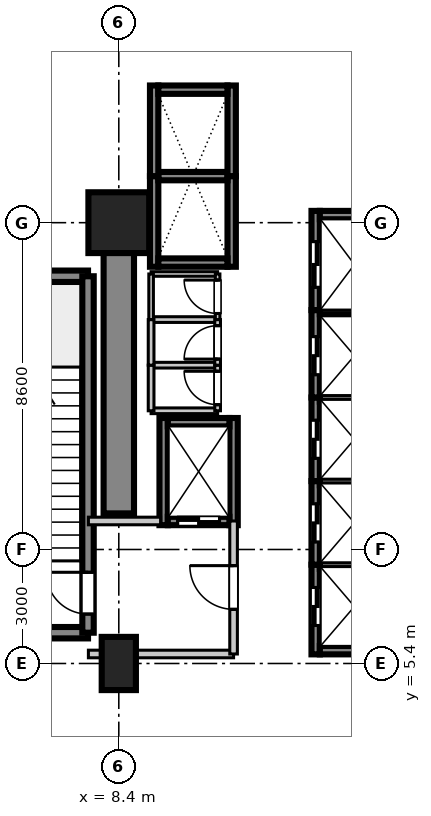
"""IFC4 building model, lengths in metres.
Left out: names, types, materials, properties, quantities, classifications, styles, units other than length and angle.
Written with IfcOpenShell. Run it as: python <this file> out.ifc"""

import sys

from ifc_helpers import new_model, si_unit, direction, frame, frame_2d, origin, origin_2d, place, context, subcontext, project, spatial, rectangle, extrude, source, transform, mapped, element, fill, save


model = new_model("IFC4")
c1 = context("Model", 3, precision=1e-05, world=origin(), true_north=direction((0.0, 1.0)))
c2 = subcontext(c1, "Body", "Model", "MODEL_VIEW")
j1 = project(units=[si_unit("LENGTHUNIT", "METRE"), si_unit("PLANEANGLEUNIT", "RADIAN")], contexts=[c1])
p1 = place(None, origin())
s1 = spatial("IfcSite", under=j1, at=p1, CompositionType="ELEMENT")
p2 = place(p1, origin())
s2 = spatial("IfcBuilding", under=s1, at=p2, CompositionType="ELEMENT")
p3 = place(p2, frame((0.0, 0.0, 16.2)))
s3 = spatial("IfcBuildingStorey", under=s2, at=p3, CompositionType="ELEMENT", Elevation=16.2)
m1 = source(origin(), c2, "Body", "SweptSolid", [
    extrude(rectangle(XDim=0.9, YDim=1.4, at=origin_2d()), origin(), (0.0, 0.0, 1.0), 5.355),
])
p4 = place(p3, frame((8.4, 5.4, 0.0), z_axis=(0.0, 0.0, 1.0), x_axis=(1.0, 0.0, 0.0)))
e1 = element("IfcColumn", 1, at=p4, inside=s3, PredefinedType="PILASTER", context=c2, shape_type="MappedRepresentation", body=[
    mapped(m1, transform((0.0, 0.0, 0.0), scale=1.0)),
])
m2 = source(origin(), c2, "Body", "SweptSolid", [
    extrude(rectangle(XDim=1.6, YDim=1.6, at=origin_2d()), origin(), (0.0, 0.0, 1.0), 5.355),
])
p5 = place(p3, frame((8.4, 17.0, 0.0), z_axis=(0.0, 0.0, 1.0), x_axis=(1.0, 0.0, 0.0)))
e2 = element("IfcColumn", 2, at=p5, inside=s3, PredefinedType="COLUMN", context=c2, shape_type="MappedRepresentation", body=[
    mapped(m2, transform((0.0, 0.0, 0.0), scale=1.0)),
])
m3 = source(origin(), c2, "Body", "SweptSolid", [
    extrude(rectangle(XDim=7.65, YDim=0.8, at=frame_2d((3.825, 0.0))), origin(), (0.0, 0.0, 1.0), 5.08),
])
p6 = place(p3, frame((8.4, 9.35, 0.0), z_axis=(0.0, 0.0, 1.0), x_axis=(0.0, 1.0, 0.0)))
e3 = element("IfcWall", 3, at=p6, inside=s3, PredefinedType="SHEAR", context=c2, shape_type="MappedRepresentation", body=[
    mapped(m3, transform((0.0, 0.0, 0.0), scale=1.0)),
])
m4 = source(origin(), c2, "Body", "SweptSolid", [
    extrude(rectangle(XDim=3.98, YDim=0.3, at=frame_2d((1.99, 0.0))), origin(), (0.0, 0.0, 1.0), 5.08),
])
for number, where, z_axis, x_axis in (
    (4, (3.61, 6.21, 0.0), (0.0, 0.0, 1.0), (1.0, 0.0, 0.0)),
    (5, (3.61, 15.59, 0.0), (0.0, 0.0, 1.0), (1.0, 0.0, 0.0)),
):
    element("IfcWall", number, at=place(p3, frame(where, z_axis=z_axis, x_axis=x_axis)), inside=s3, PredefinedType="SHEAR", context=c2, shape_type="MappedRepresentation", body=[
        mapped(m4, transform((0.0, 0.0, 0.0), scale=1.0)),
    ])
m5 = source(origin(), c2, "Body", "SweptSolid", [
    extrude(rectangle(XDim=9.38, YDim=0.3, at=frame_2d((4.69, 0.0))), origin(), (0.0, 0.0, 1.0), 5.08),
])
p7 = place(p3, frame((7.59, 6.21, 0.0), z_axis=(0.0, 0.0, 1.0), x_axis=(0.0, 1.0, 0.0)))
e6 = element("IfcWall", 6, at=p7, inside=s3, PredefinedType="SHEAR", context=c2, shape_type="MappedRepresentation", body=[
    mapped(m5, transform((0.0, 0.0, 0.0), scale=1.0)),
])
p8 = place(p7, frame((0.49, 0.0, 0.0)))
e7 = element("IfcOpeningElement", 7, at=p8, cuts=e6, PredefinedType="OPENING", context=c2, shape_type="SweptSolid", body=[
    extrude(rectangle(XDim=1.1, YDim=2.15, at=frame_2d((0.55, 1.075))), frame((0.0, 0.16, 0.0), z_axis=(0.0, -1.0, 0.0), x_axis=(1.0, 0.0, 0.0)), (0.0, 0.0, 1.0), 0.32),
])
m6 = source(origin(), c2, "Body", "SweptSolid", [
    extrude(rectangle(XDim=2.36, YDim=0.22, at=frame_2d((1.18, 0.0))), origin(), (0.0, 0.0, 1.0), 5.08),
])
p9 = place(p3, frame((13.58, 5.64, 0.0), z_axis=(0.0, 0.0, 1.0), x_axis=(0.0, 1.0, 0.0)))
e8 = element("IfcWall", 8, at=p9, inside=s3, PredefinedType="SHEAR", context=c2, shape_type="MappedRepresentation", body=[
    mapped(m6, transform((0.0, 0.0, 0.0), scale=1.0)),
])
p10 = place(p9, frame((0.76, 0.0, 0.0)))
e9 = element("IfcOpeningElement", 9, at=p10, cuts=e8, PredefinedType="OPENING", context=c2, shape_type="SweptSolid", body=[
    extrude(rectangle(XDim=1.0, YDim=2.2, at=frame_2d((0.5, 1.1))), frame((0.0, 0.12, 0.0), z_axis=(0.0, -1.0, 0.0), x_axis=(1.0, 0.0, 0.0)), (0.0, 0.0, 1.0), 0.24),
])
m7 = source(origin(), c2, "Body", "SweptSolid", [
    extrude(rectangle(XDim=1.82, YDim=0.22, at=frame_2d((0.91, 0.0))), origin(), (0.0, 0.0, 1.0), 5.08),
])
p11 = place(p3, frame((13.69, 5.75, 0.0), z_axis=(0.0, 0.0, 1.0), x_axis=(1.0, 0.0, 0.0)))
e10 = element("IfcWall", 10, at=p11, inside=s3, PredefinedType="SHEAR", context=c2, shape_type="MappedRepresentation", body=[
    mapped(m7, transform((0.0, 0.0, 0.0), scale=1.0)),
])
m8 = source(origin(), c2, "Body", "SweptSolid", [
    extrude(rectangle(XDim=1.82, YDim=0.22, at=frame_2d((0.91, 0.0))), origin(), (0.0, 0.0, 1.0), 5.4),
])
p12 = place(p3, frame((13.69, 8.0, 0.0), z_axis=(0.0, 0.0, 1.0), x_axis=(1.0, 0.0, 0.0)))
e11 = element("IfcWall", 11, at=p12, inside=s3, PredefinedType="SHEAR", context=c2, shape_type="MappedRepresentation", body=[
    mapped(m8, transform((0.0, 0.0, 0.0), scale=1.0)),
])
m9 = source(origin(), c2, "Body", "SweptSolid", [
    extrude(rectangle(XDim=2.2, YDim=0.22, at=frame_2d((1.1, 0.0))), origin(), (0.0, 0.0, 1.0), 5.08),
])
p13 = place(p3, frame((13.58, 8.0, 0.0), z_axis=(0.0, 0.0, 1.0), x_axis=(0.0, 1.0, 0.0)))
e12 = element("IfcWall", 12, at=p13, inside=s3, PredefinedType="SHEAR", context=c2, shape_type="MappedRepresentation", body=[
    mapped(m9, transform((0.0, 0.0, 0.0), scale=1.0)),
])
p14 = place(p13, frame((0.6, 0.0, 0.0)))
e13 = element("IfcOpeningElement", 13, at=p14, cuts=e12, PredefinedType="OPENING", context=c2, shape_type="SweptSolid", body=[
    extrude(rectangle(XDim=1.0, YDim=2.2, at=frame_2d((0.5, 1.1))), frame((0.0, 0.12, 0.0), z_axis=(0.0, -1.0, 0.0), x_axis=(1.0, 0.0, 0.0)), (0.0, 0.0, 1.0), 0.24),
])
p15 = place(p3, frame((13.69, 10.2, 0.0), z_axis=(0.0, 0.0, 1.0), x_axis=(1.0, 0.0, 0.0)))
e14 = element("IfcWall", 14, at=p15, inside=s3, PredefinedType="SHEAR", context=c2, shape_type="MappedRepresentation", body=[
    mapped(m8, transform((0.0, 0.0, 0.0), scale=1.0)),
])
p16 = place(p3, frame((13.58, 10.2, 0.0), z_axis=(0.0, 0.0, 1.0), x_axis=(0.0, 1.0, 0.0)))
e15 = element("IfcWall", 15, at=p16, inside=s3, PredefinedType="SHEAR", context=c2, shape_type="MappedRepresentation", body=[
    mapped(m9, transform((0.0, 0.0, 0.0), scale=1.0)),
])
p17 = place(p16, frame((0.6, 0.0, 0.0)))
e16 = element("IfcOpeningElement", 16, at=p17, cuts=e15, PredefinedType="OPENING", context=c2, shape_type="SweptSolid", body=[
    extrude(rectangle(XDim=1.0, YDim=2.2, at=frame_2d((0.5, 1.1))), frame((0.0, 0.12, 0.0), z_axis=(0.0, -1.0, 0.0), x_axis=(1.0, 0.0, 0.0)), (0.0, 0.0, 1.0), 0.24),
])
p18 = place(p3, frame((13.69, 12.4, 0.0), z_axis=(0.0, 0.0, 1.0), x_axis=(1.0, 0.0, 0.0)))
e17 = element("IfcWall", 17, at=p18, inside=s3, PredefinedType="SHEAR", context=c2, shape_type="MappedRepresentation", body=[
    mapped(m8, transform((0.0, 0.0, 0.0), scale=1.0)),
])
m10 = source(origin(), c2, "Body", "SweptSolid", [
    extrude(rectangle(XDim=2.3, YDim=0.22, at=frame_2d((1.15, 0.0))), origin(), (0.0, 0.0, 1.0), 5.08),
])
p19 = place(p3, frame((13.58, 12.4, 0.0), z_axis=(0.0, 0.0, 1.0), x_axis=(0.0, 1.0, 0.0)))
e18 = element("IfcWall", 18, at=p19, inside=s3, PredefinedType="SHEAR", context=c2, shape_type="MappedRepresentation", body=[
    mapped(m10, transform((0.0, 0.0, 0.0), scale=1.0)),
])
p20 = place(p19, frame((0.6, 0.0, 0.0)))
e19 = element("IfcOpeningElement", 19, at=p20, cuts=e18, PredefinedType="OPENING", context=c2, shape_type="SweptSolid", body=[
    extrude(rectangle(XDim=1.0, YDim=2.2, at=frame_2d((0.5, 1.1))), frame((0.0, 0.12, 0.0), z_axis=(0.0, -1.0, 0.0), x_axis=(1.0, 0.0, 0.0)), (0.0, 0.0, 1.0), 0.24),
])
p21 = place(p3, frame((13.69, 14.7, 0.0), z_axis=(0.0, 0.0, 1.0), x_axis=(1.0, 0.0, 0.0)))
e20 = element("IfcWall", 20, at=p21, inside=s3, PredefinedType="SHEAR", context=c2, shape_type="MappedRepresentation", body=[
    mapped(m8, transform((0.0, 0.0, 0.0), scale=1.0)),
])
m11 = source(origin(), c2, "Body", "SweptSolid", [
    extrude(rectangle(XDim=2.385, YDim=0.22, at=frame_2d((1.192, 0.0))), origin(), (0.0, 0.0, 1.0), 5.08),
])
for number, where, z_axis, x_axis in (
    (21, (9.33, 15.84, 0.0), (0.0, 0.0, 1.0), (0.0, 1.0, 0.0)),
    (22, (11.37, 15.84, 0.0), (0.0, 0.0, 1.0), (0.0, 1.0, 0.0)),
):
    element("IfcWall", number, at=place(p3, frame(where, z_axis=z_axis, x_axis=x_axis)), inside=s3, PredefinedType="SHEAR", context=c2, shape_type="MappedRepresentation", body=[
        mapped(m11, transform((0.0, 0.0, 0.0), scale=1.0)),
    ])
p22 = place(p3, frame((9.44, 15.95, 0.0), z_axis=(0.0, 0.0, 1.0), x_axis=(1.0, 0.0, 0.0)))
e23 = element("IfcWall", 23, at=p22, inside=s3, PredefinedType="SHEAR", context=c2, shape_type="MappedRepresentation", body=[
    mapped(m7, transform((0.0, 0.0, 0.0), scale=1.0)),
])
p23 = place(p3, frame((9.44, 18.225, 0.0), z_axis=(0.0, 0.0, 1.0), x_axis=(1.0, 0.0, 0.0)))
e24 = element("IfcWall", 24, at=p23, inside=s3, PredefinedType="SHEAR", context=c2, shape_type="MappedRepresentation", body=[
    mapped(m8, transform((0.0, 0.0, 0.0), scale=1.0)),
])
for number, where, z_axis, x_axis in (
    (25, (9.33, 18.225, 0.0), (0.0, 0.0, 1.0), (0.0, 1.0, 0.0)),
    (26, (11.37, 18.225, 0.0), (0.0, 0.0, 1.0), (0.0, 1.0, 0.0)),
):
    element("IfcWall", number, at=place(p3, frame(where, z_axis=z_axis, x_axis=x_axis)), inside=s3, PredefinedType="SHEAR", context=c2, shape_type="MappedRepresentation", body=[
        mapped(m11, transform((0.0, 0.0, 0.0), scale=1.0)),
    ])
p24 = place(p3, frame((9.44, 20.5, 0.0), z_axis=(0.0, 0.0, 1.0), x_axis=(1.0, 0.0, 0.0)))
e27 = element("IfcWall", 27, at=p24, inside=s3, PredefinedType="SHEAR", context=c2, shape_type="MappedRepresentation", body=[
    mapped(m7, transform((0.0, 0.0, 0.0), scale=1.0)),
])
m12 = source(origin(), c2, "Body", "SweptSolid", [
    extrude(rectangle(XDim=2.82, YDim=0.22, at=frame_2d((1.41, 0.0))), origin(), (0.0, 0.0, 1.0), 5.08),
])
for number, where, z_axis, x_axis in (
    (28, (9.58, 9.04, 0.0), (0.0, 0.0, 1.0), (0.0, 1.0, 0.0)),
    (29, (11.42, 9.04, 0.0), (0.0, 0.0, 1.0), (0.0, 1.0, 0.0)),
):
    element("IfcWall", number, at=place(p3, frame(where, z_axis=z_axis, x_axis=x_axis)), inside=s3, PredefinedType="SHEAR", context=c2, shape_type="MappedRepresentation", body=[
        mapped(m12, transform((0.0, 0.0, 0.0), scale=1.0)),
    ])
m13 = source(origin(), c2, "Body", "SweptSolid", [
    extrude(rectangle(XDim=1.62, YDim=0.22, at=frame_2d((0.81, 0.0))), origin(), (0.0, 0.0, 1.0), 5.08),
])
p25 = place(p3, frame((9.69, 9.15, 0.0), z_axis=(0.0, 0.0, 1.0), x_axis=(1.0, 0.0, 0.0)))
e30 = element("IfcWall", 30, at=p25, inside=s3, PredefinedType="SHEAR", context=c2, shape_type="MappedRepresentation", body=[
    mapped(m13, transform((0.0, 0.0, 0.0), scale=1.0)),
])
p26 = place(p25, frame((0.26, 0.0, 0.0)))
e31 = element("IfcOpeningElement", 31, at=p26, cuts=e30, PredefinedType="OPENING", context=c2, shape_type="SweptSolid", body=[
    extrude(rectangle(XDim=1.1, YDim=2.2, at=frame_2d((0.55, 1.1))), frame((0.0, 0.12, 0.0), z_axis=(0.0, -1.0, 0.0), x_axis=(1.0, 0.0, 0.0)), (0.0, 0.0, 1.0), 0.24),
])
p27 = place(p3, frame((9.69, 11.75, 0.0), z_axis=(0.0, 0.0, 1.0), x_axis=(1.0, 0.0, 0.0)))
e32 = element("IfcWall", 32, at=p27, inside=s3, PredefinedType="SHEAR", context=c2, shape_type="MappedRepresentation", body=[
    mapped(m13, transform((0.0, 0.0, 0.0), scale=1.0)),
])
m14 = source(origin(), c2, "Body", "SweptSolid", [
    extrude(rectangle(XDim=2.61, YDim=0.22, at=frame_2d((1.305, 0.0))), origin(), (0.0, 0.0, 1.0), 5.08),
])
p28 = place(p3, frame((13.58, 14.7, 0.0), z_axis=(0.0, 0.0, 1.0), x_axis=(0.0, 1.0, 0.0)))
e33 = element("IfcWall", 33, at=p28, inside=s3, PredefinedType="SHEAR", context=c2, shape_type="MappedRepresentation", body=[
    mapped(m14, transform((0.0, 0.0, 0.0), scale=1.0)),
])
p29 = place(p28, frame((0.6, 0.0, 0.0)))
e34 = element("IfcOpeningElement", 34, at=p29, cuts=e33, PredefinedType="OPENING", context=c2, shape_type="SweptSolid", body=[
    extrude(rectangle(XDim=1.2, YDim=2.2, at=frame_2d((0.6, 1.1))), frame((0.0, 0.12, 0.0), z_axis=(0.0, -1.0, 0.0), x_axis=(1.0, 0.0, 0.0)), (0.0, 0.0, 1.0), 0.24),
])
p30 = place(p3, frame((13.69, 17.2, 0.0), z_axis=(0.0, 0.0, 1.0), x_axis=(1.0, 0.0, 0.0)))
e35 = element("IfcWall", 35, at=p30, inside=s3, PredefinedType="SHEAR", context=c2, shape_type="MappedRepresentation", body=[
    mapped(m7, transform((0.0, 0.0, 0.0), scale=1.0)),
])
m15 = source(origin(), c2, "Body", "SweptSolid", [
    extrude(rectangle(XDim=3.82, YDim=0.2, at=frame_2d((1.91, 0.0))), origin(), (0.0, 0.0, 1.0), 3.4),
])
p31 = place(p3, frame((7.6, 5.65, 0.0), z_axis=(0.0, 0.0, 1.0), x_axis=(1.0, 0.0, 0.0)))
e36 = element("IfcWall", 36, at=p31, inside=s3, PredefinedType="PARTITIONING", context=c2, shape_type="MappedRepresentation", body=[
    mapped(m15, transform((0.0, 0.0, 0.0), scale=1.0)),
])
m16 = source(origin(), c2, "Body", "SweptSolid", [
    extrude(rectangle(XDim=1.9, YDim=0.2, at=frame_2d((0.95, 0.0))), origin(), (0.0, 0.0, 1.0), 3.4),
])
p32 = place(p3, frame((7.6, 9.15, 0.0), z_axis=(0.0, 0.0, 1.0), x_axis=(1.0, 0.0, 0.0)))
e37 = element("IfcWall", 37, at=p32, inside=s3, PredefinedType="PARTITIONING", context=c2, shape_type="MappedRepresentation", body=[
    mapped(m16, transform((0.0, 0.0, 0.0), scale=1.0)),
])
m17 = source(origin(), c2, "Body", "SweptSolid", [
    extrude(rectangle(XDim=3.5, YDim=0.2, at=frame_2d((1.75, 0.0))), origin(), (0.0, 0.0, 1.0), 3.4),
])
p33 = place(p3, frame((11.42, 5.65, 0.0), z_axis=(0.0, 0.0, 1.0), x_axis=(0.0, 1.0, 0.0)))
e38 = element("IfcWall", 38, at=p33, inside=s3, PredefinedType="PARTITIONING", context=c2, shape_type="MappedRepresentation", body=[
    mapped(m17, transform((0.0, 0.0, 0.0), scale=1.0)),
])
p34 = place(p33, frame((1.175, 0.0, 0.0)))
e39 = element("IfcOpeningElement", 39, at=p34, cuts=e38, PredefinedType="OPENING", context=c2, shape_type="SweptSolid", body=[
    extrude(rectangle(XDim=1.15, YDim=2.15, at=frame_2d((0.575, 1.075))), frame((0.0, 0.11, 0.0), z_axis=(0.0, -1.0, 0.0), x_axis=(1.0, 0.0, 0.0)), (0.0, 0.0, 1.0), 0.22),
])
m18 = source(origin(), c2, "Body", "SweptSolid", [
    extrude(rectangle(XDim=1.75, YDim=0.15, at=frame_2d((0.875, 0.0))), origin(), (0.0, 0.0, 1.0), 3.4),
])
for number, where, z_axis, x_axis in (
    (40, (9.25, 12.05, 0.0), (0.0, 0.0, 1.0), (1.0, 0.0, 0.0)),
    (41, (9.25, 13.25, 0.0), (0.0, 0.0, 1.0), (1.0, 0.0, 0.0)),
):
    element("IfcWall", number, at=place(p3, frame(where, z_axis=z_axis, x_axis=x_axis)), inside=s3, PredefinedType="PARTITIONING", context=c2, shape_type="MappedRepresentation", body=[
        mapped(m18, transform((0.0, 0.0, 0.0), scale=1.0)),
    ])
m19 = source(origin(), c2, "Body", "SweptSolid", [
    extrude(rectangle(XDim=1.2, YDim=0.15, at=frame_2d((0.6, 0.0))), origin(), (0.0, 0.0, 1.0), 3.4),
])
p35 = place(p3, frame((9.25, 12.05, 0.0), z_axis=(0.0, 0.0, 1.0), x_axis=(0.0, 1.0, 0.0)))
e42 = element("IfcWall", 42, at=p35, inside=s3, PredefinedType="PARTITIONING", context=c2, shape_type="MappedRepresentation", body=[
    mapped(m19, transform((0.0, 0.0, 0.0), scale=1.0)),
])
p36 = place(p3, frame((11.0, 12.05, 0.0), z_axis=(0.0, 0.0, 1.0), x_axis=(0.0, 1.0, 0.0)))
e43 = element("IfcWall", 43, at=p36, inside=s3, PredefinedType="PARTITIONING", context=c2, shape_type="MappedRepresentation", body=[
    mapped(m19, transform((0.0, 0.0, 0.0), scale=1.0)),
])
p37 = place(p36, frame((0.16, 0.0, 0.0)))
e44 = element("IfcOpeningElement", 44, at=p37, cuts=e43, PredefinedType="OPENING", context=c2, shape_type="SweptSolid", body=[
    extrude(rectangle(XDim=0.88, YDim=2.1, at=frame_2d((0.44, 1.05))), frame((0.0, 0.085, 0.0), z_axis=(0.0, -1.0, 0.0), x_axis=(1.0, 0.0, 0.0)), (0.0, 0.0, 1.0), 0.17),
])
p38 = place(p3, frame((9.25, 14.45, 0.0), z_axis=(0.0, 0.0, 1.0), x_axis=(1.0, 0.0, 0.0)))
e45 = element("IfcWall", 45, at=p38, inside=s3, PredefinedType="PARTITIONING", context=c2, shape_type="MappedRepresentation", body=[
    mapped(m18, transform((0.0, 0.0, 0.0), scale=1.0)),
])
p39 = place(p3, frame((9.25, 13.25, 0.0), z_axis=(0.0, 0.0, 1.0), x_axis=(0.0, 1.0, 0.0)))
e46 = element("IfcWall", 46, at=p39, inside=s3, PredefinedType="PARTITIONING", context=c2, shape_type="MappedRepresentation", body=[
    mapped(m19, transform((0.0, 0.0, 0.0), scale=1.0)),
])
p40 = place(p3, frame((11.0, 13.25, 0.0), z_axis=(0.0, 0.0, 1.0), x_axis=(0.0, 1.0, 0.0)))
e47 = element("IfcWall", 47, at=p40, inside=s3, PredefinedType="PARTITIONING", context=c2, shape_type="MappedRepresentation", body=[
    mapped(m19, transform((0.0, 0.0, 0.0), scale=1.0)),
])
p41 = place(p40, frame((0.16, 0.0, 0.0)))
e48 = element("IfcOpeningElement", 48, at=p41, cuts=e47, PredefinedType="OPENING", context=c2, shape_type="SweptSolid", body=[
    extrude(rectangle(XDim=0.88, YDim=2.1, at=frame_2d((0.44, 1.05))), frame((0.0, 0.085, 0.0), z_axis=(0.0, -1.0, 0.0), x_axis=(1.0, 0.0, 0.0)), (0.0, 0.0, 1.0), 0.17),
])
m20 = source(origin(), c2, "Body", "SweptSolid", [
    extrude(rectangle(XDim=1.75, YDim=0.12, at=frame_2d((0.875, 0.0))), origin(), (0.0, 0.0, 1.0), 3.4),
])
p42 = place(p3, frame((9.25, 15.65, 0.0), z_axis=(0.0, 0.0, 1.0), x_axis=(1.0, 0.0, 0.0)))
e49 = element("IfcWall", 49, at=p42, inside=s3, PredefinedType="PARTITIONING", context=c2, shape_type="MappedRepresentation", body=[
    mapped(m20, transform((0.0, 0.0, 0.0), scale=1.0)),
])
m21 = source(origin(), c2, "Body", "SweptSolid", [
    extrude(rectangle(XDim=1.2, YDim=0.12, at=frame_2d((0.6, 0.0))), origin(), (0.0, 0.0, 1.0), 3.4),
])
p43 = place(p3, frame((9.25, 14.45, 0.0), z_axis=(0.0, 0.0, 1.0), x_axis=(0.0, 1.0, 0.0)))
e50 = element("IfcWall", 50, at=p43, inside=s3, PredefinedType="PARTITIONING", context=c2, shape_type="MappedRepresentation", body=[
    mapped(m21, transform((0.0, 0.0, 0.0), scale=1.0)),
])
p44 = place(p3, frame((11.0, 14.45, 0.0), z_axis=(0.0, 0.0, 1.0), x_axis=(0.0, 1.0, 0.0)))
e51 = element("IfcWall", 51, at=p44, inside=s3, PredefinedType="PARTITIONING", context=c2, shape_type="MappedRepresentation", body=[
    mapped(m21, transform((0.0, 0.0, 0.0), scale=1.0)),
])
p45 = place(p44, frame((0.16, 0.0, 0.0)))
e52 = element("IfcOpeningElement", 52, at=p45, cuts=e51, PredefinedType="OPENING", context=c2, shape_type="SweptSolid", body=[
    extrude(rectangle(XDim=0.88, YDim=2.1, at=frame_2d((0.44, 1.05))), frame((0.0, 0.07, 0.0), z_axis=(0.0, -1.0, 0.0), x_axis=(1.0, 0.0, 0.0)), (0.0, 0.0, 1.0), 0.14),
])
m22 = source(origin(), c2, "Body", "SweptSolid", [
    extrude(rectangle(XDim=1.1, YDim=2.15, at=frame_2d((0.55, 1.075))), frame((0.0, 0.025, 0.0), z_axis=(0.0, -1.0, 0.0), x_axis=(1.0, 0.0, 0.0)), (0.0, 0.0, 1.0), 0.05),
])
p46 = place(p8, origin())
e53 = element("IfcDoor", 53, at=p46, inside=s3, OperationType="SINGLE_SWING_RIGHT", PredefinedType="DOOR", context=c2, shape_type="MappedRepresentation", body=[
    mapped(m22, transform((0.0, 0.0, 0.0), scale=1.0)),
])
fill(e7, e53)
m23 = source(origin(), c2, "Body", "SweptSolid", [
    extrude(rectangle(XDim=1.0, YDim=2.2, at=frame_2d((0.5, 1.1))), frame((0.0, 0.025, 0.0), z_axis=(0.0, -1.0, 0.0), x_axis=(1.0, 0.0, 0.0)), (0.0, 0.0, 1.0), 0.05),
])
p47 = place(p10, origin())
e54 = element("IfcDoor", 54, at=p47, inside=s3, OperationType="DOUBLE_DOOR_SLIDING", PredefinedType="DOOR", context=c2, shape_type="MappedRepresentation", body=[
    mapped(m23, transform((0.0, 0.0, 0.0), scale=1.0)),
])
fill(e9, e54)
p48 = place(p14, origin())
e55 = element("IfcDoor", 55, at=p48, inside=s3, OperationType="DOUBLE_DOOR_SLIDING", PredefinedType="DOOR", context=c2, shape_type="MappedRepresentation", body=[
    mapped(m23, transform((0.0, 0.0, 0.0), scale=1.0)),
])
fill(e13, e55)
p49 = place(p17, origin())
e56 = element("IfcDoor", 56, at=p49, inside=s3, OperationType="DOUBLE_DOOR_SLIDING", PredefinedType="DOOR", context=c2, shape_type="MappedRepresentation", body=[
    mapped(m23, transform((0.0, 0.0, 0.0), scale=1.0)),
])
fill(e16, e56)
p50 = place(p20, origin())
e57 = element("IfcDoor", 57, at=p50, inside=s3, OperationType="DOUBLE_DOOR_SLIDING", PredefinedType="DOOR", context=c2, shape_type="MappedRepresentation", body=[
    mapped(m23, transform((0.0, 0.0, 0.0), scale=1.0)),
])
fill(e19, e57)
m24 = source(origin(), c2, "Body", "SweptSolid", [
    extrude(rectangle(XDim=1.1, YDim=2.2, at=frame_2d((0.55, 1.1))), frame((0.0, 0.025, 0.0), z_axis=(0.0, -1.0, 0.0), x_axis=(1.0, 0.0, 0.0)), (0.0, 0.0, 1.0), 0.05),
])
p51 = place(p26, frame((1.1, 0.0, 0.0), z_axis=(0.0, 0.0, 1.0), x_axis=(-1.0, 0.0, 0.0)))
e58 = element("IfcDoor", 58, at=p51, inside=s3, OperationType="DOUBLE_DOOR_SLIDING", PredefinedType="DOOR", context=c2, shape_type="MappedRepresentation", body=[
    mapped(m24, transform((0.0, 0.0, 0.0), scale=1.0)),
])
fill(e31, e58)
m25 = source(origin(), c2, "Body", "SweptSolid", [
    extrude(rectangle(XDim=1.2, YDim=2.2, at=frame_2d((0.6, 1.1))), frame((0.0, 0.025, 0.0), z_axis=(0.0, -1.0, 0.0), x_axis=(1.0, 0.0, 0.0)), (0.0, 0.0, 1.0), 0.05),
])
p52 = place(p29, origin())
e59 = element("IfcDoor", 59, at=p52, inside=s3, OperationType="DOUBLE_DOOR_SLIDING", PredefinedType="DOOR", context=c2, shape_type="MappedRepresentation", body=[
    mapped(m25, transform((0.0, 0.0, 0.0), scale=1.0)),
])
fill(e34, e59)
m26 = source(origin(), c2, "Body", "SweptSolid", [
    extrude(rectangle(XDim=1.15, YDim=2.15, at=frame_2d((0.575, 1.075))), frame((0.0, 0.025, 0.0), z_axis=(0.0, -1.0, 0.0), x_axis=(1.0, 0.0, 0.0)), (0.0, 0.0, 1.0), 0.05),
])
p53 = place(p34, frame((1.15, 0.0, 0.0), z_axis=(0.0, 0.0, 1.0), x_axis=(-1.0, 0.0, 0.0)))
e60 = element("IfcDoor", 60, at=p53, inside=s3, OperationType="SINGLE_SWING_RIGHT", PredefinedType="DOOR", context=c2, shape_type="MappedRepresentation", body=[
    mapped(m26, transform((0.0, 0.0, 0.0), scale=1.0)),
])
fill(e39, e60)
m27 = source(origin(), c2, "Body", "SweptSolid", [
    extrude(rectangle(XDim=0.88, YDim=2.1, at=frame_2d((0.44, 1.05))), frame((0.0, 0.025, 0.0), z_axis=(0.0, -1.0, 0.0), x_axis=(1.0, 0.0, 0.0)), (0.0, 0.0, 1.0), 0.05),
])
p54 = place(p37, origin())
e61 = element("IfcDoor", 61, at=p54, inside=s3, OperationType="SINGLE_SWING_RIGHT", PredefinedType="DOOR", context=c2, shape_type="MappedRepresentation", body=[
    mapped(m27, transform((0.0, 0.0, 0.0), scale=1.0)),
])
fill(e44, e61)
p55 = place(p41, origin())
e62 = element("IfcDoor", 62, at=p55, inside=s3, OperationType="SINGLE_SWING_LEFT", PredefinedType="DOOR", context=c2, shape_type="MappedRepresentation", body=[
    mapped(m27, transform((0.0, 0.0, 0.0), scale=1.0)),
])
fill(e48, e62)
p56 = place(p45, origin())
e63 = element("IfcDoor", 63, at=p56, inside=s3, OperationType="SINGLE_SWING_RIGHT", PredefinedType="DOOR", context=c2, shape_type="MappedRepresentation", body=[
    mapped(m27, transform((0.0, 0.0, 0.0), scale=1.0)),
])
fill(e52, e63)
save(model, sys.argv[1])
